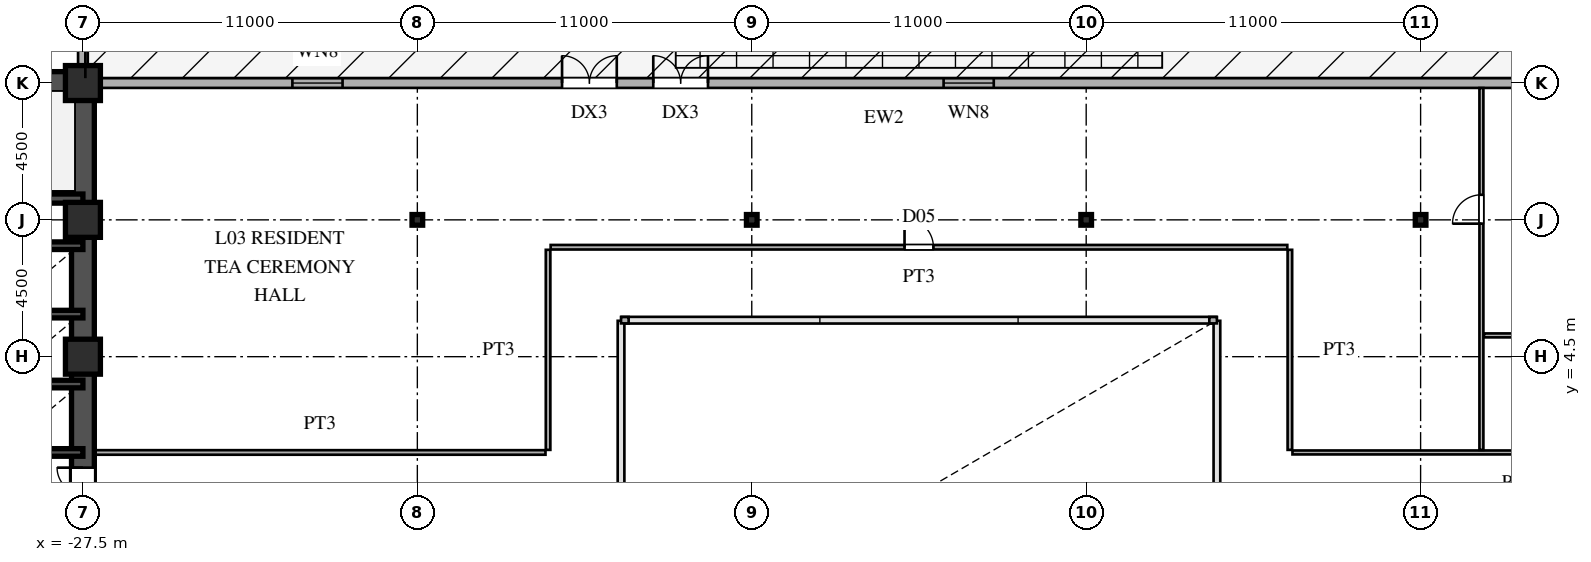
"""IFC4 building model, lengths in metres.
Left out: names, types, materials, properties, quantities, classifications, styles, units other than length and angle.
Written with IfcOpenShell. Run it as: python <this file> out.ifc"""

import sys

from ifc_helpers import new_model, si_unit, direction, frame, frame_2d, origin, origin_2d, place, context, subcontext, project, spatial, rectangle, hollow_rectangle, i_section, extrude, source, transform, mapped, element, fill, save


model = new_model("IFC4")
c1 = context("Model", 3, precision=1e-05, world=origin(), true_north=direction((0.0, 1.0)))
c2 = subcontext(c1, "Body", "Model", "MODEL_VIEW")
j1 = project(units=[si_unit("LENGTHUNIT", "METRE"), si_unit("PLANEANGLEUNIT", "RADIAN")], contexts=[c1])
p1 = place(None, origin())
s1 = spatial("IfcSite", under=j1, at=p1, CompositionType="ELEMENT")
p2 = place(p1, origin())
s2 = spatial("IfcBuilding", under=s1, at=p2, CompositionType="ELEMENT")
p3 = place(p2, frame((0.0, 0.0, 14.4)))
s3 = spatial("IfcBuildingStorey", under=s2, at=p3, CompositionType="ELEMENT", Elevation=14.4)
m1 = source(origin(), c2, "Body", "SweptSolid", [
    extrude(hollow_rectangle(XDim=1.15, YDim=1.15, WallThickness=0.048, at=origin_2d()), origin(), (0.0, 0.0, 1.0), 4.5),
])
for number, where, z_axis, x_axis in (
    (1, (-27.5, 4.5, 0.0), (0.0, 0.0, 1.0), (1.0, 0.0, 0.0)),
    (2, (-27.5, 9.0, 0.0), (0.0, 0.0, 1.0), (1.0, 0.0, 0.0)),
    (3, (-27.5, 13.5, 0.0), (0.0, 0.0, 1.0), (1.0, 0.0, 0.0)),
):
    element("IfcColumn", number, at=place(p3, frame(where, z_axis=z_axis, x_axis=x_axis)), inside=s3, PredefinedType="COLUMN", context=c2, shape_type="MappedRepresentation", body=[
        mapped(m1, transform((0.0, 0.0, 0.0), scale=1.0)),
    ])
m2 = source(origin(), c2, "Body", "SweptSolid", [
    extrude(i_section(OverallWidth=0.35, OverallDepth=0.35, WebThickness=0.012, FlangeThickness=0.019, at=origin_2d()), origin(), (0.0, 0.0, 1.0), 4.5),
])
for number, where, z_axis, x_axis in (
    (4, (-16.5, 9.0, 0.0), (0.0, 0.0, 1.0), (1.0, 0.0, 0.0)),
    (5, (-5.5, 9.0, 0.0), (0.0, 0.0, 1.0), (1.0, 0.0, 0.0)),
    (6, (5.5, 9.0, 0.0), (0.0, 0.0, 1.0), (1.0, 0.0, 0.0)),
    (7, (16.5, 9.0, 0.0), (0.0, 0.0, 1.0), (1.0, 0.0, 0.0)),
):
    element("IfcColumn", number, at=place(p3, frame(where, z_axis=z_axis, x_axis=x_axis)), inside=s3, PredefinedType="COLUMN", context=c2, shape_type="MappedRepresentation", body=[
        mapped(m2, transform((0.0, 0.0, 0.0), scale=1.0)),
    ])
p4 = place(p3, frame((27.46, 13.5, 0.0), z_axis=(0.0, 0.0, 1.0), x_axis=(-1.0, 0.0, 0.0)))
e8 = element("IfcWall", 8, at=p4, inside=s3, PredefinedType="SOLIDWALL", context=c2, shape_type="SweptSolid", body=[
    extrude(rectangle(XDim=54.92, YDim=0.32, at=frame_2d((27.46, 0.0))), origin(), (0.0, 0.0, 1.0), 4.28),
])
p5 = place(p4, frame((34.4, 0.0, 0.0)))
e9 = element("IfcOpeningElement", 9, at=p5, cuts=e8, PredefinedType="OPENING", context=c2, shape_type="SweptSolid", body=[
    extrude(rectangle(XDim=1.8, YDim=2.3, at=frame_2d((0.9, 1.15))), frame((0.0, 0.17, 0.0), z_axis=(0.0, -1.0, 0.0), x_axis=(1.0, 0.0, 0.0)), (0.0, 0.0, 1.0), 0.34),
])
p6 = place(p4, frame((37.4, 0.0, 0.0)))
e10 = element("IfcOpeningElement", 10, at=p6, cuts=e8, PredefinedType="OPENING", context=c2, shape_type="SweptSolid", body=[
    extrude(rectangle(XDim=1.8, YDim=2.3, at=frame_2d((0.9, 1.15))), frame((0.0, 0.17, 0.0), z_axis=(0.0, -1.0, 0.0), x_axis=(1.0, 0.0, 0.0)), (0.0, 0.0, 1.0), 0.34),
])
p7 = place(p4, frame((4.5, 0.0, 0.8)))
e11 = element("IfcOpeningElement", 11, at=p7, cuts=e8, PredefinedType="OPENING", context=c2, shape_type="SweptSolid", body=[
    extrude(rectangle(XDim=1.65, YDim=1.85, at=frame_2d((0.825, 0.925))), frame((0.0, 0.17, 0.0), z_axis=(0.0, -1.0, 0.0), x_axis=(1.0, 0.0, 0.0)), (0.0, 0.0, 1.0), 0.34),
])
p8 = place(p4, frame((25.0, 0.0, 0.8)))
e12 = element("IfcOpeningElement", 12, at=p8, cuts=e8, PredefinedType="OPENING", context=c2, shape_type="SweptSolid", body=[
    extrude(rectangle(XDim=1.65, YDim=1.85, at=frame_2d((0.825, 0.925))), frame((0.0, 0.17, 0.0), z_axis=(0.0, -1.0, 0.0), x_axis=(1.0, 0.0, 0.0)), (0.0, 0.0, 1.0), 0.34),
])
p9 = place(p4, frame((46.42, 0.0, 0.8)))
e13 = element("IfcOpeningElement", 13, at=p9, cuts=e8, PredefinedType="OPENING", context=c2, shape_type="SweptSolid", body=[
    extrude(rectangle(XDim=1.65, YDim=1.85, at=frame_2d((0.825, 0.925))), frame((0.0, 0.17, 0.0), z_axis=(0.0, -1.0, 0.0), x_axis=(1.0, 0.0, 0.0)), (0.0, 0.0, 1.0), 0.34),
])
p10 = place(p3, frame((-27.5, 13.55, 0.0), z_axis=(0.0, 0.0, 1.0), x_axis=(0.0, 1.0, 0.0)))
e14 = element("IfcWall", 14, at=p10, inside=s3, PredefinedType="SOLIDWALL", context=c2, shape_type="SweptSolid", body=[
    extrude(rectangle(XDim=10.4, YDim=0.32, at=frame_2d((5.2, 0.0))), origin(), (0.0, 0.0, 1.0), 2.78),
])
for number, where, z_axis, x_axis in (
    (15, (9.8, 5.7, 0.0), (0.0, 0.0, 1.0), (-1.0, 0.0, 0.0)),
    (16, (-9.8, 5.7, 0.0), (0.0, 0.0, 1.0), (1.0, 0.0, 0.0)),
):
    element("IfcWall", number, at=place(p3, frame(where, z_axis=z_axis, x_axis=x_axis)), inside=s3, PredefinedType="SOLIDWALL", context=c2, shape_type="SweptSolid", body=[
        extrude(rectangle(XDim=0.25, YDim=0.21, at=frame_2d((0.125, 0.0))), origin(), (0.0, 0.0, 1.0), 4.28),
    ])
p11 = place(p3, frame((-27.5, 1.3, 0.0), z_axis=(0.0, 0.0, 1.0), x_axis=(0.0, 1.0, 0.0)))
e17 = element("IfcWall", 17, at=p11, inside=s3, PredefinedType="SHEAR", context=c2, shape_type="SweptSolid", body=[
    extrude(rectangle(XDim=12.2, YDim=0.75, at=frame_2d((6.1, 0.0))), origin(), (0.0, 0.0, 1.0), 4.28),
])
p12 = place(p3, frame((-27.5, -1.3, 0.0), z_axis=(0.0, 0.0, 1.0), x_axis=(0.0, 1.0, 0.0)))
e18 = element("IfcWall", 18, at=p12, inside=s3, PredefinedType="SHEAR", context=c2, shape_type="SweptSolid", body=[
    extrude(rectangle(XDim=2.6, YDim=0.75, at=frame_2d((1.3, 0.0))), origin(), (0.0, 0.0, 1.0), 4.28),
])
p13 = place(p12, frame((0.45, 0.0, 0.0)))
e19 = element("IfcOpeningElement", 19, at=p13, cuts=e18, PredefinedType="OPENING", context=c2, shape_type="SweptSolid", body=[
    extrude(rectangle(XDim=1.7, YDim=2.35, at=frame_2d((0.85, 1.175))), frame((0.0, 0.385, 0.0), z_axis=(0.0, -1.0, 0.0), x_axis=(1.0, 0.0, 0.0)), (0.0, 0.0, 1.0), 0.77),
])
p14 = place(p3, frame((-36.5, 13.5, 0.0), z_axis=(0.0, 0.0, 1.0), x_axis=(1.0, 0.0, 0.0)))
e20 = element("IfcWall", 20, at=p14, inside=s3, PredefinedType="SHEAR", context=c2, shape_type="SweptSolid", body=[
    extrude(rectangle(XDim=9.0, YDim=0.75, at=frame_2d((4.5, 0.0))), origin(), (0.0, 0.0, 1.0), 4.28),
])
p15 = place(p3, frame((-36.5, 9.7, 0.0), z_axis=(0.0, 0.0, 1.0), x_axis=(1.0, 0.0, 0.0)))
e21 = element("IfcWall", 21, at=p15, inside=s3, PredefinedType="SHEAR", context=c2, shape_type="SweptSolid", body=[
    extrude(rectangle(XDim=9.0, YDim=0.3, at=frame_2d((4.5, 0.0))), origin(), (0.0, 0.0, 1.0), 4.28),
])
p16 = place(p15, frame((0.6, 0.0, 0.0)))
e22 = element("IfcOpeningElement", 22, at=p16, cuts=e21, PredefinedType="OPENING", context=c2, shape_type="SweptSolid", body=[
    extrude(rectangle(XDim=1.1, YDim=2.2, at=frame_2d((0.55, 1.1))), frame((0.0, 0.16, 0.0), z_axis=(0.0, -1.0, 0.0), x_axis=(1.0, 0.0, 0.0)), (0.0, 0.0, 1.0), 0.32),
])
for number, where, z_axis, x_axis in (
    (23, (-30.3, 1.35, 0.0), (0.0, 0.0, 1.0), (1.0, 0.0, 0.0)),
    (24, (-30.3, 3.6, 0.0), (0.0, 0.0, 1.0), (1.0, 0.0, 0.0)),
    (25, (-30.3, 5.9, 0.0), (0.0, 0.0, 1.0), (1.0, 0.0, 0.0)),
    (26, (-30.3, 8.15, 0.0), (0.0, 0.0, 1.0), (1.0, 0.0, 0.0)),
):
    element("IfcWall", number, at=place(p3, frame(where, z_axis=z_axis, x_axis=x_axis)), inside=s3, PredefinedType="SHEAR", context=c2, shape_type="SweptSolid", body=[
        extrude(rectangle(XDim=2.8, YDim=0.25, at=frame_2d((1.4, 0.0))), origin(), (0.0, 0.0, 1.0), 4.28),
    ])
p17 = place(p3, frame((-27.12, 1.35, 0.0), z_axis=(0.0, 0.0, 1.0), x_axis=(1.0, 0.0, 0.0)))
e27 = element("IfcWall", 27, at=p17, inside=s3, PredefinedType="PARTITIONING", context=c2, shape_type="SweptSolid", body=[
    extrude(rectangle(XDim=14.835, YDim=0.15, at=frame_2d((7.417, 0.0))), origin(), (0.0, 0.0, 1.0), 4.28),
])
p18 = place(p3, frame((12.285, 1.35, 0.0), z_axis=(0.0, 0.0, 1.0), x_axis=(1.0, 0.0, 0.0)))
e28 = element("IfcWall", 28, at=p18, inside=s3, PredefinedType="PARTITIONING", context=c2, shape_type="SweptSolid", body=[
    extrude(rectangle(XDim=14.835, YDim=0.13, at=frame_2d((7.417, 0.0))), origin(), (0.0, 0.0, 1.0), 4.28),
])
p19 = place(p18, frame((8.025, 0.0, 0.0)))
e29 = element("IfcOpeningElement", 29, at=p19, cuts=e28, PredefinedType="OPENING", context=c2, shape_type="SweptSolid", body=[
    extrude(rectangle(XDim=0.88, YDim=2.1, at=frame_2d((0.44, 1.05))), frame((0.0, 0.075, 0.0), z_axis=(0.0, -1.0, 0.0), x_axis=(1.0, 0.0, 0.0)), (0.0, 0.0, 1.0), 0.15),
])
p20 = place(p18, frame((12.375, 0.0, 0.0)))
e30 = element("IfcOpeningElement", 30, at=p20, cuts=e28, PredefinedType="OPENING", context=c2, shape_type="SweptSolid", body=[
    extrude(rectangle(XDim=0.88, YDim=2.1, at=frame_2d((0.44, 1.05))), frame((0.0, 0.075, 0.0), z_axis=(0.0, -1.0, 0.0), x_axis=(1.0, 0.0, 0.0)), (0.0, 0.0, 1.0), 0.15),
])
p21 = place(p3, frame((18.585, 5.2, 0.0), z_axis=(0.0, 0.0, 1.0), x_axis=(1.0, 0.0, 0.0)))
e31 = element("IfcWall", 31, at=p21, inside=s3, PredefinedType="PARTITIONING", context=c2, shape_type="SweptSolid", body=[
    extrude(rectangle(XDim=8.535, YDim=0.13, at=frame_2d((4.268, 0.0))), origin(), (0.0, 0.0, 1.0), 4.28),
])
p22 = place(p3, frame((-12.115, 8.1, 0.0), z_axis=(0.0, 0.0, 1.0), x_axis=(1.0, 0.0, 0.0)))
e32 = element("IfcWall", 32, at=p22, inside=s3, PredefinedType="PARTITIONING", context=c2, shape_type="SweptSolid", body=[
    extrude(rectangle(XDim=24.23, YDim=0.15, at=frame_2d((12.115, 0.0))), origin(), (0.0, 0.0, 1.0), 4.28),
])
p23 = place(p22, frame((11.64, 0.0, 0.0)))
e33 = element("IfcOpeningElement", 33, at=p23, cuts=e32, PredefinedType="OPENING", context=c2, shape_type="SweptSolid", body=[
    extrude(rectangle(XDim=0.95, YDim=2.15, at=frame_2d((0.475, 1.075))), frame((0.0, 0.085, 0.0), z_axis=(0.0, -1.0, 0.0), x_axis=(1.0, 0.0, 0.0)), (0.0, 0.0, 1.0), 0.17),
])
for number, where, z_axis, x_axis in (
    (34, (-12.2, 1.435, 0.0), (0.0, 0.0, 1.0), (0.0, 1.0, 0.0)),
    (35, (12.2, 1.435, 0.0), (0.0, 0.0, 1.0), (0.0, 1.0, 0.0)),
):
    element("IfcWall", number, at=place(p3, frame(where, z_axis=z_axis, x_axis=x_axis)), inside=s3, PredefinedType="PARTITIONING", context=c2, shape_type="SweptSolid", body=[
        extrude(rectangle(XDim=6.58, YDim=0.15, at=frame_2d((3.29, 0.0))), origin(), (0.0, 0.0, 1.0), 4.28),
    ])
p24 = place(p3, frame((18.5, 1.435, 0.0), z_axis=(0.0, 0.0, 1.0), x_axis=(0.0, 1.0, 0.0)))
e36 = element("IfcWall", 36, at=p24, inside=s3, PredefinedType="PARTITIONING", context=c2, shape_type="SweptSolid", body=[
    extrude(rectangle(XDim=11.9, YDim=0.13, at=frame_2d((5.95, 0.0))), origin(), (0.0, 0.0, 1.0), 4.28),
])
p25 = place(p24, frame((7.44, 0.0, 0.0)))
e37 = element("IfcOpeningElement", 37, at=p25, cuts=e36, PredefinedType="OPENING", context=c2, shape_type="SweptSolid", body=[
    extrude(rectangle(XDim=0.95, YDim=2.15, at=frame_2d((0.475, 1.075))), frame((0.0, 0.075, 0.0), z_axis=(0.0, -1.0, 0.0), x_axis=(1.0, 0.0, 0.0)), (0.0, 0.0, 1.0), 0.15),
])
m3 = source(origin(), c2, "Body", "SweptSolid", [
    extrude(rectangle(XDim=1.8, YDim=2.3, at=frame_2d((0.9, 1.15))), frame((0.0, 0.025, 0.0), z_axis=(0.0, -1.0, 0.0), x_axis=(1.0, 0.0, 0.0)), (0.0, 0.0, 1.0), 0.05),
])
p26 = place(p5, frame((1.8, 0.0, 0.0), z_axis=(0.0, 0.0, 1.0), x_axis=(-1.0, 0.0, 0.0)))
e38 = element("IfcDoor", 38, at=p26, inside=s3, OperationType="DOUBLE_SWING_LEFT", PredefinedType="DOOR", context=c2, shape_type="MappedRepresentation", body=[
    mapped(m3, transform((0.0, 0.0, 0.0), scale=1.0)),
])
fill(e9, e38)
p27 = place(p6, frame((1.8, 0.0, 0.0), z_axis=(0.0, 0.0, 1.0), x_axis=(-1.0, 0.0, 0.0)))
e39 = element("IfcDoor", 39, at=p27, inside=s3, OperationType="DOUBLE_SWING_LEFT", PredefinedType="DOOR", context=c2, shape_type="MappedRepresentation", body=[
    mapped(m3, transform((0.0, 0.0, 0.0), scale=1.0)),
])
fill(e10, e39)
m4 = source(origin(), c2, "Body", "SweptSolid", [
    extrude(rectangle(XDim=1.65, YDim=1.85, at=frame_2d((0.825, 0.925))), frame((0.0, 0.03, 0.0), z_axis=(0.0, -1.0, 0.0), x_axis=(1.0, 0.0, 0.0)), (0.0, 0.0, 1.0), 0.06),
])
p28 = place(p8, origin())
e40 = element("IfcWindow", 40, at=p28, inside=s3, PartitioningType="SINGLE_PANEL", PredefinedType="WINDOW", context=c2, shape_type="MappedRepresentation", body=[
    mapped(m4, transform((0.0, 0.0, 0.0), scale=1.0)),
])
fill(e12, e40)
p29 = place(p9, origin())
e41 = element("IfcWindow", 41, at=p29, inside=s3, PartitioningType="SINGLE_PANEL", PredefinedType="WINDOW", context=c2, shape_type="MappedRepresentation", body=[
    mapped(m4, transform((0.0, 0.0, 0.0), scale=1.0)),
])
fill(e13, e41)
m5 = source(origin(), c2, "Body", "SweptSolid", [
    extrude(rectangle(XDim=1.7, YDim=2.35, at=frame_2d((0.85, 1.175))), frame((0.0, 0.025, 0.0), z_axis=(0.0, -1.0, 0.0), x_axis=(1.0, 0.0, 0.0)), (0.0, 0.0, 1.0), 0.05),
])
p30 = place(p13, origin())
e42 = element("IfcDoor", 42, at=p30, inside=s3, OperationType="DOUBLE_SWING_LEFT", PredefinedType="DOOR", context=c2, shape_type="MappedRepresentation", body=[
    mapped(m5, transform((0.0, 0.0, 0.0), scale=1.0)),
])
fill(e19, e42)
m6 = source(origin(), c2, "Body", "SweptSolid", [
    extrude(rectangle(XDim=0.95, YDim=2.15, at=frame_2d((0.475, 1.075))), frame((0.0, 0.025, 0.0), z_axis=(0.0, -1.0, 0.0), x_axis=(1.0, 0.0, 0.0)), (0.0, 0.0, 1.0), 0.05),
])
p31 = place(p23, origin())
e43 = element("IfcDoor", 43, at=p31, inside=s3, OperationType="SINGLE_SWING_LEFT", PredefinedType="DOOR", context=c2, shape_type="MappedRepresentation", body=[
    mapped(m6, transform((0.0, 0.0, 0.0), scale=1.0)),
])
fill(e33, e43)
p32 = place(p25, origin())
e44 = element("IfcDoor", 44, at=p32, inside=s3, OperationType="SINGLE_SWING_LEFT", PredefinedType="DOOR", context=c2, shape_type="MappedRepresentation", body=[
    mapped(m6, transform((0.0, 0.0, 0.0), scale=1.0)),
])
fill(e37, e44)
save(model, sys.argv[1])
